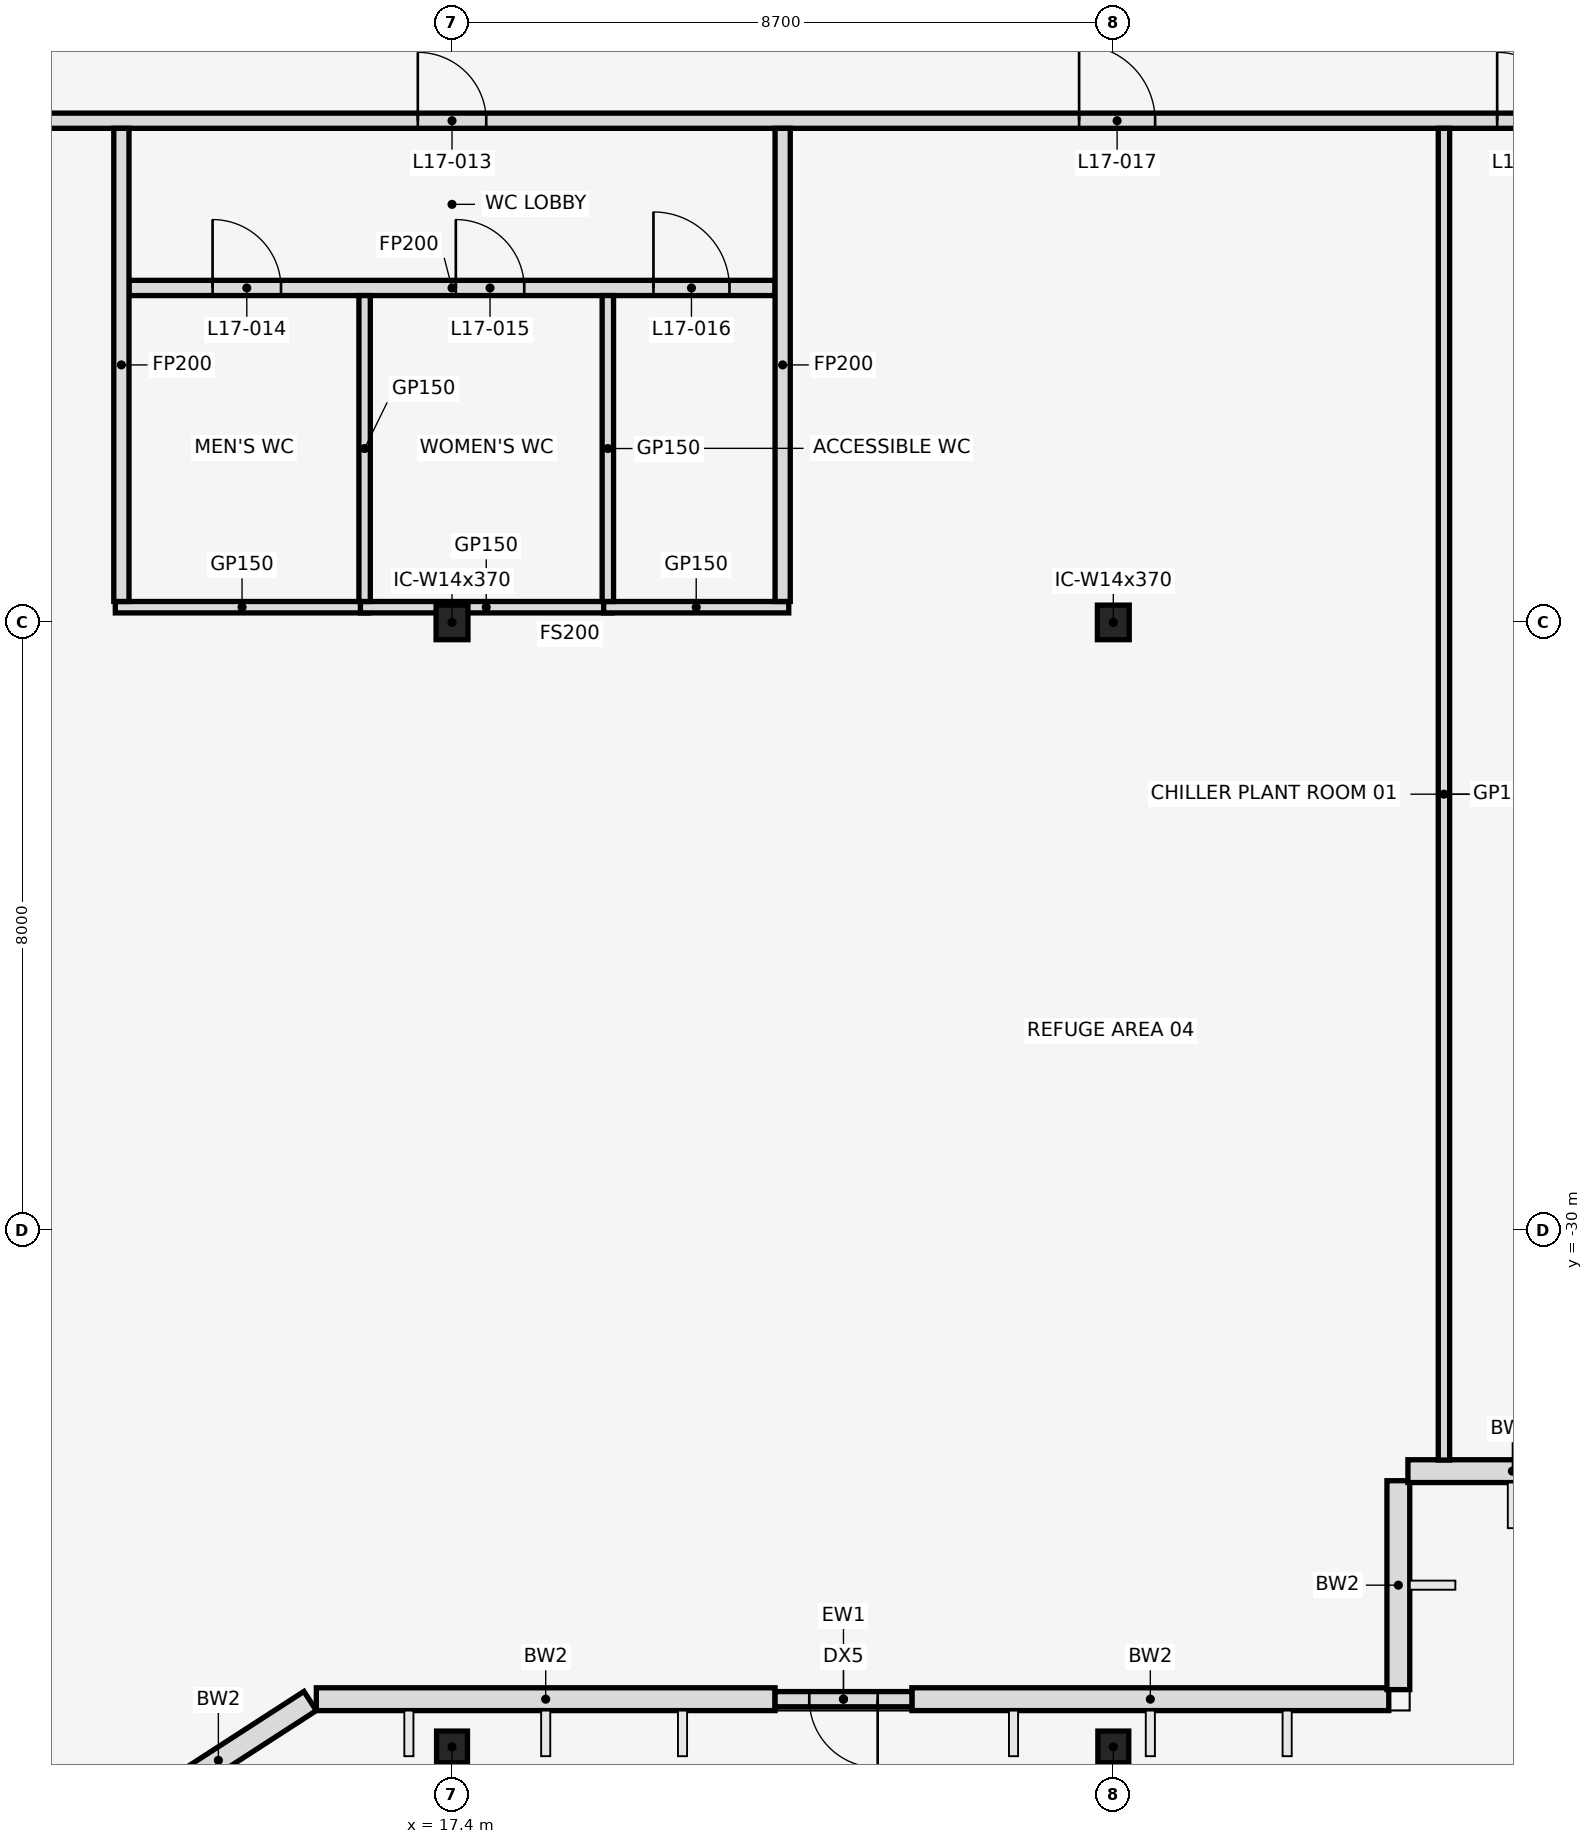
"""IFC4 building model, lengths in metres.
Left out: names, types, materials, properties, quantities, classifications, styles, units other than length and angle.
Written with IfcOpenShell. Run it as: python <this file> out.ifc"""

import sys

from ifc_helpers import new_model, si_unit, direction, frame, frame_2d, origin, origin_2d, place, context, subcontext, project, spatial, rectangle, i_section, extrude, element, fill, save


model = new_model("IFC4")
c1 = context("Model", 3, precision=1e-05, world=origin(), true_north=direction((0.0, 1.0)))
c2 = subcontext(c1, "Body", "Model", "MODEL_VIEW")
j1 = project(units=[si_unit("LENGTHUNIT", "METRE"), si_unit("PLANEANGLEUNIT", "RADIAN")], contexts=[c1])
p1 = place(None, origin())
s1 = spatial("IfcSite", under=j1, at=p1, CompositionType="ELEMENT")
p2 = place(p1, origin())
s2 = spatial("IfcBuilding", under=s1, at=p2, CompositionType="ELEMENT")
p3 = place(p2, frame((0.0, 0.0, 84.5)))
s3 = spatial("IfcBuildingStorey", under=s2, at=p3, CompositionType="ELEMENT", Elevation=84.5)
for number, where, z_axis, x_axis in (
    (1, (17.4, -36.794, 0.0), (0.0, 0.0, 1.0), (1.0, 0.0, 0.0)),
    (2, (26.1, -36.794, 0.0), (0.0, 0.0, 1.0), (1.0, 0.0, 0.0)),
):
    element("IfcColumn", number, at=place(p3, frame(where, z_axis=z_axis, x_axis=x_axis)), inside=s3, PredefinedType="COLUMN", context=c2, shape_type="SweptSolid", body=[
        extrude(i_section(OverallWidth=0.406, OverallDepth=0.417, WebThickness=0.03, FlangeThickness=0.048, at=origin_2d()), origin(), (0.0, 0.0, 1.0), 5.4),
    ])
for number, where, z_axis, x_axis in (
    (3, (17.4, -22.0, 0.0), (0.0, 0.0, 1.0), (1.0, 0.0, 0.0)),
    (4, (26.1, -22.0, 0.0), (0.0, 0.0, 1.0), (1.0, 0.0, 0.0)),
):
    element("IfcColumn", number, at=place(p3, frame(where, z_axis=z_axis, x_axis=x_axis)), inside=s3, PredefinedType="COLUMN", context=c2, shape_type="SweptSolid", body=[
        extrude(i_section(OverallWidth=0.419, OverallDepth=0.455, WebThickness=0.042, FlangeThickness=0.068, at=origin_2d()), origin(), (0.0, 0.0, 1.0), 5.4),
    ])
p4 = place(p3, frame((13.119, -37.751, 0.0), z_axis=(0.0, 0.0, 1.0), x_axis=(0.839779682339, 0.542927329512, 0.0)))
e5 = element("IfcWall", 5, at=p4, inside=s3, PredefinedType="STANDARD", context=c2, shape_type="SweptSolid", body=[
    extrude(rectangle(XDim=2.875, YDim=0.3, at=frame_2d((1.438, 0.0))), origin(), (0.0, 0.0, 1.0), 4.496),
])
p5 = place(p3, frame((15.615, -36.166, 0.0), z_axis=(0.0, 0.0, 1.0), x_axis=(1.0, 0.0, 0.0)))
e6 = element("IfcWall", 6, at=p5, inside=s3, PredefinedType="STANDARD", context=c2, shape_type="SweptSolid", body=[
    extrude(rectangle(XDim=6.035, YDim=0.3, at=frame_2d((3.018, 0.0))), origin(), (0.0, 0.0, 1.0), 4.572),
])
p6 = place(p3, frame((23.45, -36.166, 0.0), z_axis=(0.0, 0.0, 1.0), x_axis=(1.0, 0.0, 0.0)))
e7 = element("IfcWall", 7, at=p6, inside=s3, PredefinedType="STANDARD", context=c2, shape_type="SweptSolid", body=[
    extrude(rectangle(XDim=6.274, YDim=0.3, at=frame_2d((3.137, 0.0))), origin(), (0.0, 0.0, 1.0), 4.572),
])
p7 = place(p3, frame((29.85, -36.04, 0.0), z_axis=(0.0, 0.0, 1.0), x_axis=(0.0, 1.0, 0.0)))
e8 = element("IfcWall", 8, at=p7, inside=s3, PredefinedType="STANDARD", context=c2, shape_type="SweptSolid", body=[
    extrude(rectangle(XDim=2.748, YDim=0.3, at=frame_2d((1.374, 0.0))), origin(), (0.0, 0.0, 1.0), 4.572),
])
p8 = place(p3, frame((29.976, -33.166, 0.0), z_axis=(0.0, 0.0, 1.0), x_axis=(1.0, 0.0, 0.0)))
e9 = element("IfcWall", 9, at=p8, inside=s3, PredefinedType="STANDARD", context=c2, shape_type="SweptSolid", body=[
    extrude(rectangle(XDim=2.748, YDim=0.3, at=frame_2d((1.374, 0.0))), origin(), (0.0, 0.0, 1.0), 4.572),
])
p9 = place(p3, frame((23.45, -36.166, 0.0), z_axis=(0.0, 0.0, 1.0), x_axis=(-1.0, 0.0, 0.0)))
e10 = element("IfcWall", 10, at=p9, inside=s3, PredefinedType="STANDARD", context=c2, shape_type="SweptSolid", body=[
    extrude(rectangle(XDim=1.8, YDim=0.2, at=frame_2d((0.9, 0.0))), origin(), (0.0, 0.0, 1.0), 5.25),
])
p10 = place(p9, frame((0.45, 0.0, 0.0)))
e11 = element("IfcOpeningElement", 11, at=p10, cuts=e10, PredefinedType="OPENING", context=c2, shape_type="SweptSolid", body=[
    extrude(rectangle(XDim=0.9, YDim=2.1, at=frame_2d((0.45, 1.05))), frame((0.0, 0.112, 0.0), z_axis=(0.0, -1.0, 0.0), x_axis=(1.0, 0.0, 0.0)), (0.0, 0.0, 1.0), 0.224),
])
p11 = place(p3, frame((12.97, -21.8, 0.0), z_axis=(0.0, 0.0, 1.0), x_axis=(1.0, 0.0, 0.0)))
e12 = element("IfcWall", 12, at=p11, inside=s3, PredefinedType="PARTITIONING", context=c2, shape_type="SweptSolid", body=[
    extrude(rectangle(XDim=3.335, YDim=0.15, at=frame_2d((1.667, 0.0))), origin(), (0.0, 0.0, 1.0), 4.318),
])
p12 = place(p3, frame((16.195, -21.8, 0.0), z_axis=(0.0, 0.0, 1.0), x_axis=(1.0, 0.0, 0.0)))
e13 = element("IfcWall", 13, at=p12, inside=s3, PredefinedType="PARTITIONING", context=c2, shape_type="SweptSolid", body=[
    extrude(rectangle(XDim=3.31, YDim=0.15, at=frame_2d((1.655, 0.0))), origin(), (0.0, 0.0, 1.0), 4.318),
])
p13 = place(p3, frame((19.395, -21.8, 0.0), z_axis=(0.0, 0.0, 1.0), x_axis=(1.0, 0.0, 0.0)))
e14 = element("IfcWall", 14, at=p13, inside=s3, PredefinedType="PARTITIONING", context=c2, shape_type="SweptSolid", body=[
    extrude(rectangle(XDim=2.435, YDim=0.15, at=frame_2d((1.218, 0.0))), origin(), (0.0, 0.0, 1.0), 4.318),
])
p14 = place(p3, frame((13.15, -17.6, 0.0), z_axis=(0.0, 0.0, 1.0), x_axis=(1.0, 0.0, 0.0)))
e15 = element("IfcWall", 15, at=p14, inside=s3, PredefinedType="PARTITIONING", context=c2, shape_type="SweptSolid", body=[
    extrude(rectangle(XDim=8.5, YDim=0.2, at=frame_2d((4.25, 0.0))), origin(), (0.0, 0.0, 1.0), 4.318),
])
p15 = place(p14, frame((1.1, 0.0, 0.0)))
e16 = element("IfcOpeningElement", 16, at=p15, cuts=e15, PredefinedType="OPENING", context=c2, shape_type="SweptSolid", body=[
    extrude(rectangle(XDim=0.9, YDim=2.1, at=frame_2d((0.45, 1.05))), frame((0.0, 0.112, 0.0), z_axis=(0.0, -1.0, 0.0), x_axis=(1.0, 0.0, 0.0)), (0.0, 0.0, 1.0), 0.224),
])
p16 = place(p14, frame((4.3, 0.0, 0.0)))
e17 = element("IfcOpeningElement", 17, at=p16, cuts=e15, PredefinedType="OPENING", context=c2, shape_type="SweptSolid", body=[
    extrude(rectangle(XDim=0.9, YDim=2.1, at=frame_2d((0.45, 1.05))), frame((0.0, 0.112, 0.0), z_axis=(0.0, -1.0, 0.0), x_axis=(1.0, 0.0, 0.0)), (0.0, 0.0, 1.0), 0.224),
])
p17 = place(p14, frame((6.9, 0.0, 0.0)))
e18 = element("IfcOpeningElement", 18, at=p17, cuts=e15, PredefinedType="OPENING", context=c2, shape_type="SweptSolid", body=[
    extrude(rectangle(XDim=1.0, YDim=2.1, at=frame_2d((0.5, 1.05))), frame((0.0, 0.112, 0.0), z_axis=(0.0, -1.0, 0.0), x_axis=(1.0, 0.0, 0.0)), (0.0, 0.0, 1.0), 0.224),
])
p18 = place(p3, frame((-32.7, -15.4, 0.0), z_axis=(0.0, 0.0, 1.0), x_axis=(1.0, 0.0, 0.0)))
e19 = element("IfcWall", 19, at=p18, inside=s3, PredefinedType="PARTITIONING", context=c2, shape_type="SweptSolid", body=[
    extrude(rectangle(XDim=65.4, YDim=0.2, at=frame_2d((32.7, 0.0))), origin(), (0.0, 0.0, 1.0), 4.318),
])
p19 = place(p18, frame((0.7, 0.0, 0.0)))
e20 = element("IfcOpeningElement", 20, at=p19, cuts=e19, PredefinedType="OPENING", context=c2, shape_type="SweptSolid", body=[
    extrude(rectangle(XDim=0.9, YDim=2.1, at=frame_2d((0.45, 1.05))), frame((0.0, 0.112, 0.0), z_axis=(0.0, -1.0, 0.0), x_axis=(1.0, 0.0, 0.0)), (0.0, 0.0, 1.0), 0.224),
])
p20 = place(p18, frame((6.05, 0.0, 0.0)))
e21 = element("IfcOpeningElement", 21, at=p20, cuts=e19, PredefinedType="OPENING", context=c2, shape_type="SweptSolid", body=[
    extrude(rectangle(XDim=1.0, YDim=2.1, at=frame_2d((0.5, 1.05))), frame((0.0, 0.112, 0.0), z_axis=(0.0, -1.0, 0.0), x_axis=(1.0, 0.0, 0.0)), (0.0, 0.0, 1.0), 0.224),
])
p21 = place(p18, frame((14.85, 0.0, 0.0)))
e22 = element("IfcOpeningElement", 22, at=p21, cuts=e19, PredefinedType="OPENING", context=c2, shape_type="SweptSolid", body=[
    extrude(rectangle(XDim=1.0, YDim=2.1, at=frame_2d((0.5, 1.05))), frame((0.0, 0.112, 0.0), z_axis=(0.0, -1.0, 0.0), x_axis=(1.0, 0.0, 0.0)), (0.0, 0.0, 1.0), 0.224),
])
p22 = place(p18, frame((23.55, 0.0, 0.0)))
e23 = element("IfcOpeningElement", 23, at=p22, cuts=e19, PredefinedType="OPENING", context=c2, shape_type="SweptSolid", body=[
    extrude(rectangle(XDim=1.0, YDim=2.1, at=frame_2d((0.5, 1.05))), frame((0.0, 0.112, 0.0), z_axis=(0.0, -1.0, 0.0), x_axis=(1.0, 0.0, 0.0)), (0.0, 0.0, 1.0), 0.224),
])
p23 = place(p18, frame((32.15, 0.0, 0.0)))
e24 = element("IfcOpeningElement", 24, at=p23, cuts=e19, PredefinedType="OPENING", context=c2, shape_type="SweptSolid", body=[
    extrude(rectangle(XDim=1.0, YDim=2.1, at=frame_2d((0.5, 1.05))), frame((0.0, 0.112, 0.0), z_axis=(0.0, -1.0, 0.0), x_axis=(1.0, 0.0, 0.0)), (0.0, 0.0, 1.0), 0.224),
])
p24 = place(p18, frame((40.95, 0.0, 0.0)))
e25 = element("IfcOpeningElement", 25, at=p24, cuts=e19, PredefinedType="OPENING", context=c2, shape_type="SweptSolid", body=[
    extrude(rectangle(XDim=1.0, YDim=2.1, at=frame_2d((0.5, 1.05))), frame((0.0, 0.112, 0.0), z_axis=(0.0, -1.0, 0.0), x_axis=(1.0, 0.0, 0.0)), (0.0, 0.0, 1.0), 0.224),
])
p25 = place(p18, frame((49.65, 0.0, 0.0)))
e26 = element("IfcOpeningElement", 26, at=p25, cuts=e19, PredefinedType="OPENING", context=c2, shape_type="SweptSolid", body=[
    extrude(rectangle(XDim=0.9, YDim=2.1, at=frame_2d((0.45, 1.05))), frame((0.0, 0.112, 0.0), z_axis=(0.0, -1.0, 0.0), x_axis=(1.0, 0.0, 0.0)), (0.0, 0.0, 1.0), 0.224),
])
p26 = place(p18, frame((58.35, 0.0, 0.0)))
e27 = element("IfcOpeningElement", 27, at=p26, cuts=e19, PredefinedType="OPENING", context=c2, shape_type="SweptSolid", body=[
    extrude(rectangle(XDim=1.0, YDim=2.1, at=frame_2d((0.5, 1.05))), frame((0.0, 0.112, 0.0), z_axis=(0.0, -1.0, 0.0), x_axis=(1.0, 0.0, 0.0)), (0.0, 0.0, 1.0), 0.224),
])
p27 = place(p18, frame((63.85, 0.0, 0.0)))
e28 = element("IfcOpeningElement", 28, at=p27, cuts=e19, PredefinedType="OPENING", context=c2, shape_type="SweptSolid", body=[
    extrude(rectangle(XDim=0.9, YDim=2.1, at=frame_2d((0.45, 1.05))), frame((0.0, 0.112, 0.0), z_axis=(0.0, -1.0, 0.0), x_axis=(1.0, 0.0, 0.0)), (0.0, 0.0, 1.0), 0.224),
])
p28 = place(p3, frame((13.05, -21.725, 0.0), z_axis=(0.0, 0.0, 1.0), x_axis=(0.0, 1.0, 0.0)))
e29 = element("IfcWall", 29, at=p28, inside=s3, PredefinedType="PARTITIONING", context=c2, shape_type="SweptSolid", body=[
    extrude(rectangle(XDim=6.225, YDim=0.2, at=frame_2d((3.113, 0.0))), origin(), (0.0, 0.0, 1.0), 4.318),
])
for number, where, z_axis, x_axis in (
    (30, (16.25, -21.725, 0.0), (0.0, 0.0, 1.0), (0.0, 1.0, 0.0)),
    (31, (19.45, -21.725, 0.0), (0.0, 0.0, 1.0), (0.0, 1.0, 0.0)),
):
    element("IfcWall", number, at=place(p3, frame(where, z_axis=z_axis, x_axis=x_axis)), inside=s3, PredefinedType="PARTITIONING", context=c2, shape_type="SweptSolid", body=[
        extrude(rectangle(XDim=4.025, YDim=0.15, at=frame_2d((2.013, 0.0))), origin(), (0.0, 0.0, 1.0), 4.318),
    ])
p29 = place(p3, frame((21.75, -21.725, 0.0), z_axis=(0.0, 0.0, 1.0), x_axis=(0.0, 1.0, 0.0)))
e32 = element("IfcWall", 32, at=p29, inside=s3, PredefinedType="PARTITIONING", context=c2, shape_type="SweptSolid", body=[
    extrude(rectangle(XDim=6.225, YDim=0.2, at=frame_2d((3.113, 0.0))), origin(), (0.0, 0.0, 1.0), 4.318),
])
p30 = place(p3, frame((30.45, -33.02, 0.0), z_axis=(0.0, 0.0, 1.0), x_axis=(0.0, 1.0, 0.0)))
e33 = element("IfcWall", 33, at=p30, inside=s3, PredefinedType="PARTITIONING", context=c2, shape_type="SweptSolid", body=[
    extrude(rectangle(XDim=17.52, YDim=0.15, at=frame_2d((8.76, 0.0))), origin(), (0.0, 0.0, 1.0), 4.318),
])
p31 = place(p10, origin())
e34 = element("IfcDoor", 34, at=p31, inside=s3, OperationType="SINGLE_SWING_LEFT", PredefinedType="DOOR", context=c2, shape_type="SweptSolid", body=[
    extrude(rectangle(XDim=0.9, YDim=2.1, at=frame_2d((0.45, 1.05))), frame((0.0, 0.025, 0.0), z_axis=(0.0, -1.0, 0.0), x_axis=(1.0, 0.0, 0.0)), (0.0, 0.0, 1.0), 0.05),
])
fill(e11, e34)
p32 = place(p25, frame((0.9, 0.0, 0.0), z_axis=(0.0, 0.0, 1.0), x_axis=(-1.0, 0.0, 0.0)))
e35 = element("IfcDoor", 35, at=p32, inside=s3, OperationType="SINGLE_SWING_LEFT", PredefinedType="DOOR", context=c2, shape_type="SweptSolid", body=[
    extrude(rectangle(XDim=0.9, YDim=2.1, at=frame_2d((0.45, 1.05))), frame((0.0, 0.025, 0.0), z_axis=(0.0, -1.0, 0.0), x_axis=(1.0, 0.0, 0.0)), (0.0, 0.0, 1.0), 0.05),
])
fill(e26, e35)
p33 = place(p15, frame((0.9, 0.0, 0.0), z_axis=(0.0, 0.0, 1.0), x_axis=(-1.0, 0.0, 0.0)))
e36 = element("IfcDoor", 36, at=p33, inside=s3, OperationType="SINGLE_SWING_RIGHT", PredefinedType="DOOR", context=c2, shape_type="SweptSolid", body=[
    extrude(rectangle(XDim=0.9, YDim=2.1, at=frame_2d((0.45, 1.05))), frame((0.0, 0.025, 0.0), z_axis=(0.0, -1.0, 0.0), x_axis=(1.0, 0.0, 0.0)), (0.0, 0.0, 1.0), 0.05),
])
fill(e16, e36)
p34 = place(p16, frame((0.9, 0.0, 0.0), z_axis=(0.0, 0.0, 1.0), x_axis=(-1.0, 0.0, 0.0)))
e37 = element("IfcDoor", 37, at=p34, inside=s3, OperationType="SINGLE_SWING_RIGHT", PredefinedType="DOOR", context=c2, shape_type="SweptSolid", body=[
    extrude(rectangle(XDim=0.9, YDim=2.1, at=frame_2d((0.45, 1.05))), frame((0.0, 0.025, 0.0), z_axis=(0.0, -1.0, 0.0), x_axis=(1.0, 0.0, 0.0)), (0.0, 0.0, 1.0), 0.05),
])
fill(e17, e37)
p35 = place(p17, frame((1.0, 0.0, 0.0), z_axis=(0.0, 0.0, 1.0), x_axis=(-1.0, 0.0, 0.0)))
e38 = element("IfcDoor", 38, at=p35, inside=s3, OperationType="SINGLE_SWING_LEFT", PredefinedType="DOOR", context=c2, shape_type="SweptSolid", body=[
    extrude(rectangle(XDim=1.0, YDim=2.1, at=frame_2d((0.5, 1.05))), frame((0.0, 0.025, 0.0), z_axis=(0.0, -1.0, 0.0), x_axis=(1.0, 0.0, 0.0)), (0.0, 0.0, 1.0), 0.05),
])
fill(e18, e38)
p36 = place(p26, frame((1.0, 0.0, 0.0), z_axis=(0.0, 0.0, 1.0), x_axis=(-1.0, 0.0, 0.0)))
e39 = element("IfcDoor", 39, at=p36, inside=s3, OperationType="SINGLE_SWING_RIGHT", PredefinedType="DOOR", context=c2, shape_type="SweptSolid", body=[
    extrude(rectangle(XDim=1.0, YDim=2.1, at=frame_2d((0.5, 1.05))), frame((0.0, 0.025, 0.0), z_axis=(0.0, -1.0, 0.0), x_axis=(1.0, 0.0, 0.0)), (0.0, 0.0, 1.0), 0.05),
])
fill(e27, e39)
p37 = place(p27, frame((0.9, 0.0, 0.0), z_axis=(0.0, 0.0, 1.0), x_axis=(-1.0, 0.0, 0.0)))
e40 = element("IfcDoor", 40, at=p37, inside=s3, OperationType="SINGLE_SWING_RIGHT", PredefinedType="DOOR", context=c2, shape_type="SweptSolid", body=[
    extrude(rectangle(XDim=0.9, YDim=2.1, at=frame_2d((0.45, 1.05))), frame((0.0, 0.025, 0.0), z_axis=(0.0, -1.0, 0.0), x_axis=(1.0, 0.0, 0.0)), (0.0, 0.0, 1.0), 0.05),
])
fill(e28, e40)
save(model, sys.argv[1])
